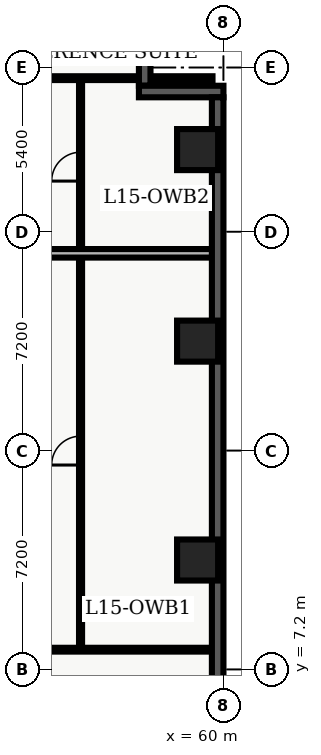
"""IFC4 building model, lengths in metres.
Left out: names, types, materials, properties, quantities, classifications, styles, units other than length and angle.
Written with IfcOpenShell. Run it as: python <this file> out.ifc"""

import sys

from ifc_helpers import new_model, entity, si_unit, converted_unit, direction, frame, origin_with_axes, origin_2d_with_axis, place, context, subcontext, project, spatial, polyline, rectangle, outline, extrude, element, fill, save


model = new_model("IFC4")
c1 = context("Model", 3, precision=1e-05, world=origin_with_axes(), true_north=direction((0.0, 1.0)))
c2 = subcontext(c1, "Body", "Model", "MODEL_VIEW")
j1 = project(units=[si_unit("LENGTHUNIT", "METRE"), converted_unit("PLANEANGLEUNIT", "DEGREE", entity("IfcPlaneAngleMeasure", 0.017), si_unit("PLANEANGLEUNIT", "RADIAN"), dimensions=[0, 0, 0, 0, 0, 0, 0])], contexts=[c1])
p1 = place(None, origin_with_axes())
s1 = spatial("IfcSite", under=j1, at=p1, CompositionType="ELEMENT")
p2 = place(p1, origin_with_axes())
s2 = spatial("IfcBuilding", under=s1, at=p2, CompositionType="ELEMENT")
p3 = place(p2, frame((0.0, 0.0, 63.9), z_axis=(0.0, 0.0, 1.0), x_axis=(1.0, 0.0, 0.0)))
s3 = spatial("IfcBuildingStorey", under=s2, at=p3, CompositionType="ELEMENT", Elevation=63.9)
for number, where, z_axis, x_axis in (
    (1, (59.15, 10.8, 0.0), (0.0, 0.0, 1.0), (1.0, 0.0, 0.0)),
    (2, (59.15, 18.0, 0.0), (0.0, 0.0, 1.0), (1.0, 0.0, 0.0)),
    (3, (59.15, 24.3, 0.0), (0.0, 0.0, 1.0), (1.0, 0.0, 0.0)),
):
    element("IfcColumn", number, at=place(p3, frame(where, z_axis=z_axis, x_axis=x_axis)), inside=s3, PredefinedType="COLUMN", context=c2, shape_type="SweptSolid", body=[
        extrude(rectangle(XDim=1.35, YDim=1.35, at=origin_2d_with_axis()), origin_with_axes(), (0.0, 0.0, 1.0), 3.9),
    ])
p4 = place(p3, frame((59.64, 7.85, 0.0), z_axis=(0.0, 0.0, 1.0), x_axis=(-1.0, 0.0, 0.0)))
e4 = element("IfcWall", 4, at=p4, inside=s3, PredefinedType="PARTITIONING", context=c2, shape_type="SweptSolid", body=[
    extrude(outline(polyline([(0.0, -0.062), (11.59, -0.062), (11.59, 0.062), (0.0, 0.062), (0.0, -0.062)])), origin_with_axes(), (0.0, 0.0, 1.0), 2.7),
])
p5 = place(p4, frame((10.29, 0.0, 0.0), z_axis=(0.0, 0.0, 1.0), x_axis=(1.0, 0.0, 0.0)))
e5 = element("IfcOpeningElement", 5, at=p5, cuts=e4, PredefinedType="OPENING", context=c2, shape_type="SweptSolid", body=[
    extrude(rectangle(XDim=1.0, YDim=0.145, at=origin_2d_with_axis()), origin_with_axes(), (0.0, 0.0, 1.0), 2.15),
])
p6 = place(p3, frame((38.76, 26.65, 0.0), z_axis=(0.0, 0.0, 1.0), x_axis=(1.0, 0.0, 0.0)))
e6 = element("IfcWall", 6, at=p6, inside=s3, PredefinedType="PARTITIONING", context=c2, shape_type="SweptSolid", body=[
    extrude(outline(polyline([(0.0, -0.062), (20.88, -0.062), (20.88, 0.062), (0.0, 0.062), (0.0, -0.062)])), origin_with_axes(), (0.0, 0.0, 1.0), 2.7),
])
p7 = place(p6, frame((4.24, 0.0, 0.0), z_axis=(0.0, 0.0, 1.0), x_axis=(1.0, 0.0, 0.0)))
e7 = element("IfcOpeningElement", 7, at=p7, cuts=e6, PredefinedType="OPENING", context=c2, shape_type="SweptSolid", body=[
    extrude(rectangle(XDim=1.0, YDim=0.145, at=origin_2d_with_axis()), origin_with_axes(), (0.0, 0.0, 1.0), 2.15),
])
p8 = place(p3, frame((55.3, 7.98, 0.0), z_axis=(0.0, 0.0, 1.0), x_axis=(0.0, 1.0, 0.0)))
e8 = element("IfcWall", 8, at=p8, inside=s3, PredefinedType="PARTITIONING", context=c2, shape_type="SweptSolid", body=[
    extrude(outline(polyline([(0.0, -0.05), (18.54, -0.05), (18.54, 0.05), (0.0, 0.05), (0.0, -0.05)])), origin_with_axes(), (0.0, 0.0, 1.0), 2.7),
])
p9 = place(p8, frame((6.419, 0.0, 0.0), z_axis=(0.0, 0.0, 1.0), x_axis=(1.0, 0.0, 0.0)))
e9 = element("IfcOpeningElement", 9, at=p9, cuts=e8, PredefinedType="OPENING", context=c2, shape_type="SweptSolid", body=[
    extrude(rectangle(XDim=0.95, YDim=0.12, at=origin_2d_with_axis()), origin_with_axes(), (0.0, 0.0, 1.0), 2.15),
])
p10 = place(p8, frame((15.759, 0.0, 0.0), z_axis=(0.0, 0.0, 1.0), x_axis=(1.0, 0.0, 0.0)))
e10 = element("IfcOpeningElement", 10, at=p10, cuts=e8, PredefinedType="OPENING", context=c2, shape_type="SweptSolid", body=[
    extrude(rectangle(XDim=0.95, YDim=0.12, at=origin_2d_with_axis()), origin_with_axes(), (0.0, 0.0, 1.0), 2.15),
])
p11 = place(p3, frame((50.57, 20.888, 0.0), z_axis=(0.0, 0.0, 1.0), x_axis=(1.0, 0.0, 0.0)))
e11 = element("IfcWall", 11, at=p11, inside=s3, PredefinedType="PARTITIONING", context=c2, shape_type="SweptSolid", body=[
    extrude(outline(polyline([(0.0, -0.14), (9.055, -0.14), (9.055, 0.14), (0.0, 0.14), (0.0, -0.14)])), origin_with_axes(), (0.0, 0.0, 1.0), 2.7),
])
p12 = place(p3, frame((57.41, 28.42, 0.0), z_axis=(0.0, 0.0, 1.0), x_axis=(0.0, -1.0, 0.0)))
e12 = element("IfcWall", 12, at=p12, inside=s3, PredefinedType="SOLIDWALL", context=c2, shape_type="SweptSolid", body=[
    extrude(outline(polyline([(0.0, -0.19), (2.02, -0.19), (2.02, 0.19), (0.0, 0.19), (0.0, -0.19)])), origin_with_axes(), (0.0, 0.0, 1.0), 3.66),
])
p13 = place(p3, frame((57.22, 26.21, 0.0), z_axis=(0.0, 0.0, 1.0), x_axis=(1.0, 0.0, 0.0)))
e13 = element("IfcWall", 13, at=p13, inside=s3, PredefinedType="SOLIDWALL", context=c2, shape_type="SweptSolid", body=[
    extrude(outline(polyline([(0.0, -0.19), (2.78, -0.19), (2.78, 0.19), (0.0, 0.19), (0.0, -0.19)])), origin_with_axes(), (0.0, 0.0, 1.0), 3.66),
])
p14 = place(p3, frame((59.81, 26.02, 0.0), z_axis=(0.0, 0.0, 1.0), x_axis=(0.0, -1.0, 0.0)))
e14 = element("IfcWall", 14, at=p14, inside=s3, PredefinedType="SOLIDWALL", context=c2, shape_type="SweptSolid", body=[
    extrude(outline(polyline([(0.0, -0.19), (23.62, -0.19), (23.62, 0.19), (0.0, 0.19), (0.0, -0.19)])), origin_with_axes(), (0.0, 0.0, 1.0), 3.66),
])
p15 = place(p14, frame((20.218, 0.0, 0.45), z_axis=(0.0, 0.0, 1.0), x_axis=(1.0, 0.0, 0.0)))
e15 = element("IfcOpeningElement", 15, at=p15, cuts=e14, PredefinedType="OPENING", context=c2, shape_type="SweptSolid", body=[
    extrude(rectangle(XDim=2.1, YDim=0.4, at=origin_2d_with_axis()), origin_with_axes(), (0.0, 0.0, 1.0), 2.2),
])
p16 = place(p8, frame((6.419, 0.0, 0.0), z_axis=(0.0, 0.0, 1.0), x_axis=(1.0, 0.0, 0.0)))
e16 = element("IfcDoor", 16, at=p16, inside=s3, OperationType="SINGLE_SWING_LEFT", PredefinedType="DOOR", context=c2, shape_type="SweptSolid", body=[
    extrude(rectangle(XDim=0.95, YDim=0.06, at=origin_2d_with_axis()), origin_with_axes(), (0.0, 0.0, 1.0), 2.15),
])
fill(e9, e16)
p17 = place(p8, frame((15.759, 0.0, 0.0), z_axis=(0.0, 0.0, 1.0), x_axis=(1.0, 0.0, 0.0)))
e17 = element("IfcDoor", 17, at=p17, inside=s3, OperationType="SINGLE_SWING_LEFT", PredefinedType="DOOR", context=c2, shape_type="SweptSolid", body=[
    extrude(rectangle(XDim=0.95, YDim=0.06, at=origin_2d_with_axis()), origin_with_axes(), (0.0, 0.0, 1.0), 2.15),
])
fill(e10, e17)
save(model, sys.argv[1])
